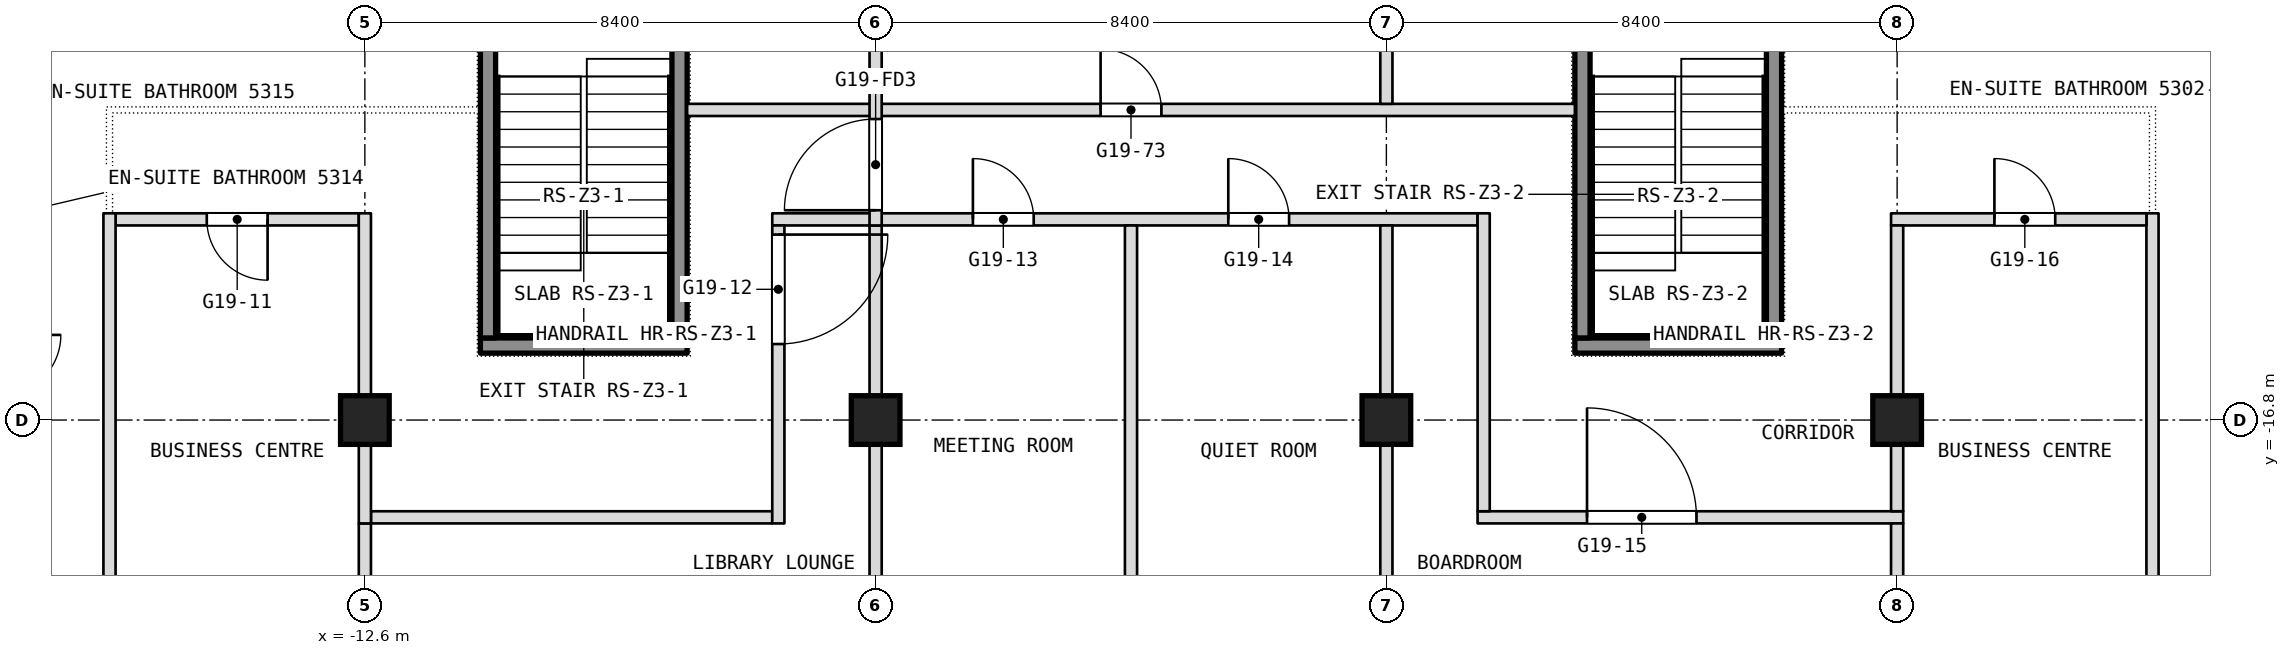
"""IFC4 building model, lengths in metres.
Left out: names, types, materials, properties, quantities, classifications, styles, units other than length and angle.
Written with IfcOpenShell. Run it as: python <this file> out.ifc"""

import sys

from ifc_helpers import new_model, si_unit, direction, frame, frame_2d, origin, origin_2d, place, context, subcontext, project, spatial, rectangle, extrude, element, fill, save


model = new_model("IFC4")
c1 = context("Model", 3, precision=1e-05, world=origin(), true_north=direction((0.0, 1.0)))
c2 = subcontext(c1, "Body", "Model", "MODEL_VIEW")
j1 = project(units=[si_unit("LENGTHUNIT", "METRE"), si_unit("PLANEANGLEUNIT", "RADIAN")], contexts=[c1])
p1 = place(None, origin())
s1 = spatial("IfcSite", under=j1, at=p1, CompositionType="ELEMENT")
p2 = place(p1, origin())
s2 = spatial("IfcBuilding", under=s1, at=p2, CompositionType="ELEMENT")
p3 = place(p2, frame((0.0, 0.0, 227.3)))
s3 = spatial("IfcBuildingStorey", under=s2, at=p3, CompositionType="ELEMENT", Elevation=227.3)
for number, where, z_axis, x_axis in (
    (1, (-12.6, -16.8, 0.0), (0.0, 0.0, 1.0), (1.0, 0.0, 0.0)),
    (2, (-4.2, -16.8, 0.0), (0.0, 0.0, 1.0), (1.0, 0.0, 0.0)),
    (3, (4.2, -16.8, 0.0), (0.0, 0.0, 1.0), (1.0, 0.0, 0.0)),
    (4, (12.6, -16.8, 0.0), (0.0, 0.0, 1.0), (1.0, 0.0, 0.0)),
):
    element("IfcColumn", number, at=place(p3, frame(where, z_axis=z_axis, x_axis=x_axis)), inside=s3, PredefinedType="COLUMN", context=c2, shape_type="SweptSolid", body=[
        extrude(rectangle(XDim=0.8, YDim=0.8, at=origin_2d()), origin(), (0.0, 0.0, 1.0), 3.6),
    ])
p4 = place(p3, frame((-12.5, -18.4, 0.0), z_axis=(0.0, 0.0, 1.0), x_axis=(1.0, 0.0, 0.0)))
e5 = element("IfcWall", 5, at=p4, inside=s3, PredefinedType="PARTITIONING", context=c2, shape_type="SweptSolid", body=[
    extrude(rectangle(XDim=6.6, YDim=0.2, at=frame_2d((3.3, 0.0))), origin(), (0.0, 0.0, 1.0), 3.34),
])
p5 = place(p3, frame((5.7, -18.4, 0.0), z_axis=(0.0, 0.0, 1.0), x_axis=(1.0, 0.0, 0.0)))
e6 = element("IfcWall", 6, at=p5, inside=s3, PredefinedType="PARTITIONING", context=c2, shape_type="SweptSolid", body=[
    extrude(rectangle(XDim=7.0, YDim=0.2, at=frame_2d((3.5, 0.0))), origin(), (0.0, 0.0, 1.0), 3.34),
])
p6 = place(p5, frame((1.8, 0.0, 0.0)))
e7 = element("IfcOpeningElement", 7, at=p6, cuts=e6, PredefinedType="OPENING", context=c2, shape_type="SweptSolid", body=[
    extrude(rectangle(XDim=1.8, YDim=2.1, at=frame_2d((0.9, 1.05))), frame((0.0, 0.1, 0.0), z_axis=(0.0, -1.0, 0.0), x_axis=(1.0, 0.0, 0.0)), (0.0, 0.0, 1.0), 0.2),
])
p7 = place(p3, frame((16.8, -20.2, 0.0), z_axis=(0.0, 0.0, 1.0), x_axis=(0.0, 1.0, 0.0)))
e8 = element("IfcWall", 8, at=p7, inside=s3, PredefinedType="PARTITIONING", context=c2, shape_type="SweptSolid", body=[
    extrude(rectangle(XDim=6.8, YDim=0.2, at=frame_2d((3.4, 0.0))), origin(), (0.0, 0.0, 1.0), 3.34),
])
p8 = place(p3, frame((-16.7, -13.5, 0.0), z_axis=(0.0, 0.0, 1.0), x_axis=(1.0, 0.0, 0.0)))
e9 = element("IfcWall", 9, at=p8, inside=s3, PredefinedType="PARTITIONING", context=c2, shape_type="SweptSolid", body=[
    extrude(rectangle(XDim=4.0, YDim=0.2, at=frame_2d((2.0, 0.0))), origin(), (0.0, 0.0, 1.0), 3.34),
])
p9 = place(p8, frame((1.5, 0.0, 0.0)))
e10 = element("IfcOpeningElement", 10, at=p9, cuts=e9, PredefinedType="OPENING", context=c2, shape_type="SweptSolid", body=[
    extrude(rectangle(XDim=1.0, YDim=2.1, at=frame_2d((0.5, 1.05))), frame((0.0, 0.1, 0.0), z_axis=(0.0, -1.0, 0.0), x_axis=(1.0, 0.0, 0.0)), (0.0, 0.0, 1.0), 0.2),
])
p10 = place(p3, frame((-5.9, -13.5, 0.0), z_axis=(0.0, 0.0, 1.0), x_axis=(1.0, 0.0, 0.0)))
e11 = element("IfcWall", 11, at=p10, inside=s3, PredefinedType="PARTITIONING", context=c2, shape_type="SweptSolid", body=[
    extrude(rectangle(XDim=11.6, YDim=0.2, at=frame_2d((5.8, 0.0))), origin(), (0.0, 0.0, 1.0), 3.34),
])
p11 = place(p10, frame((3.3, 0.0, 0.0)))
e12 = element("IfcOpeningElement", 12, at=p11, cuts=e11, PredefinedType="OPENING", context=c2, shape_type="SweptSolid", body=[
    extrude(rectangle(XDim=1.0, YDim=2.1, at=frame_2d((0.5, 1.05))), frame((0.0, 0.1, 0.0), z_axis=(0.0, -1.0, 0.0), x_axis=(1.0, 0.0, 0.0)), (0.0, 0.0, 1.0), 0.2),
])
p12 = place(p10, frame((7.5, 0.0, 0.0)))
e13 = element("IfcOpeningElement", 13, at=p12, cuts=e11, PredefinedType="OPENING", context=c2, shape_type="SweptSolid", body=[
    extrude(rectangle(XDim=1.0, YDim=2.1, at=frame_2d((0.5, 1.05))), frame((0.0, 0.1, 0.0), z_axis=(0.0, -1.0, 0.0), x_axis=(1.0, 0.0, 0.0)), (0.0, 0.0, 1.0), 0.2),
])
p13 = place(p3, frame((12.5, -13.5, 0.0), z_axis=(0.0, 0.0, 1.0), x_axis=(1.0, 0.0, 0.0)))
e14 = element("IfcWall", 14, at=p13, inside=s3, PredefinedType="PARTITIONING", context=c2, shape_type="SweptSolid", body=[
    extrude(rectangle(XDim=4.2, YDim=0.2, at=frame_2d((2.1, 0.0))), origin(), (0.0, 0.0, 1.0), 3.34),
])
p14 = place(p13, frame((1.7, 0.0, 0.0)))
e15 = element("IfcOpeningElement", 15, at=p14, cuts=e14, PredefinedType="OPENING", context=c2, shape_type="SweptSolid", body=[
    extrude(rectangle(XDim=1.0, YDim=2.1, at=frame_2d((0.5, 1.05))), frame((0.0, 0.1, 0.0), z_axis=(0.0, -1.0, 0.0), x_axis=(1.0, 0.0, 0.0)), (0.0, 0.0, 1.0), 0.2),
])
p15 = place(p3, frame((12.6, -20.0, 0.0), z_axis=(0.0, 0.0, 1.0), x_axis=(0.0, 1.0, 0.0)))
e16 = element("IfcWall", 16, at=p15, inside=s3, PredefinedType="PARTITIONING", context=c2, shape_type="SweptSolid", body=[
    extrude(rectangle(XDim=1.5, YDim=0.2, at=frame_2d((0.75, 0.0))), origin(), (0.0, 0.0, 1.0), 3.34),
])
p16 = place(p3, frame((12.6, -18.3, 0.0), z_axis=(0.0, 0.0, 1.0), x_axis=(0.0, 1.0, 0.0)))
e17 = element("IfcWall", 17, at=p16, inside=s3, PredefinedType="PARTITIONING", context=c2, shape_type="SweptSolid", body=[
    extrude(rectangle(XDim=4.7, YDim=0.2, at=frame_2d((2.35, 0.0))), origin(), (0.0, 0.0, 1.0), 3.34),
])
p17 = place(p3, frame((-7.3, -11.7, 0.0), z_axis=(0.0, 0.0, 1.0), x_axis=(1.0, 0.0, 0.0)))
e18 = element("IfcWall", 18, at=p17, inside=s3, PredefinedType="PARTITIONING", context=c2, shape_type="SweptSolid", body=[
    extrude(rectangle(XDim=14.6, YDim=0.2, at=frame_2d((7.3, 0.0))), origin(), (0.0, 0.0, 1.0), 3.34),
])
p18 = place(p17, frame((6.8, 0.0, 0.0)))
e19 = element("IfcOpeningElement", 19, at=p18, cuts=e18, PredefinedType="OPENING", context=c2, shape_type="SweptSolid", body=[
    extrude(rectangle(XDim=1.0, YDim=2.1, at=frame_2d((0.5, 1.05))), frame((0.0, 0.1, 0.0), z_axis=(0.0, -1.0, 0.0), x_axis=(1.0, 0.0, 0.0)), (0.0, 0.0, 1.0), 0.2),
])
p19 = place(p3, frame((5.8, -18.3, 0.0), z_axis=(0.0, 0.0, 1.0), x_axis=(0.0, 1.0, 0.0)))
e20 = element("IfcWall", 20, at=p19, inside=s3, PredefinedType="PARTITIONING", context=c2, shape_type="SweptSolid", body=[
    extrude(rectangle(XDim=4.9, YDim=0.2, at=frame_2d((2.45, 0.0))), origin(), (0.0, 0.0, 1.0), 3.34),
])
p20 = place(p3, frame((4.2, -20.0, 0.0), z_axis=(0.0, 0.0, 1.0), x_axis=(0.0, 1.0, 0.0)))
e21 = element("IfcWall", 21, at=p20, inside=s3, PredefinedType="PARTITIONING", context=c2, shape_type="SweptSolid", body=[
    extrude(rectangle(XDim=6.4, YDim=0.2, at=frame_2d((3.2, 0.0))), origin(), (0.0, 0.0, 1.0), 3.34),
])
p21 = place(p3, frame((4.2, -11.6, 0.0), z_axis=(0.0, 0.0, 1.0), x_axis=(0.0, 1.0, 0.0)))
e22 = element("IfcWall", 22, at=p21, inside=s3, PredefinedType="PARTITIONING", context=c2, shape_type="SweptSolid", body=[
    extrude(rectangle(XDim=9.7, YDim=0.2, at=frame_2d((4.85, 0.0))), origin(), (0.0, 0.0, 1.0), 3.34),
])
p22 = place(p3, frame((0.0, -20.0, 0.0), z_axis=(0.0, 0.0, 1.0), x_axis=(0.0, 1.0, 0.0)))
e23 = element("IfcWall", 23, at=p22, inside=s3, PredefinedType="PARTITIONING", context=c2, shape_type="SweptSolid", body=[
    extrude(rectangle(XDim=6.4, YDim=0.2, at=frame_2d((3.2, 0.0))), origin(), (0.0, 0.0, 1.0), 3.34),
])
p23 = place(p3, frame((-4.2, -22.0, 0.0), z_axis=(0.0, 0.0, 1.0), x_axis=(0.0, 1.0, 0.0)))
e24 = element("IfcWall", 24, at=p23, inside=s3, PredefinedType="PARTITIONING", context=c2, shape_type="SweptSolid", body=[
    extrude(rectangle(XDim=8.4, YDim=0.2, at=frame_2d((4.2, 0.0))), origin(), (0.0, 0.0, 1.0), 3.34),
])
p24 = place(p23, frame((0.25, 0.0, 0.0)))
e25 = element("IfcOpeningElement", 25, at=p24, cuts=e24, PredefinedType="OPENING", context=c2, shape_type="SweptSolid", body=[
    extrude(rectangle(XDim=1.5, YDim=2.1, at=frame_2d((0.75, 1.05))), frame((0.0, 0.1, 0.0), z_axis=(0.0, -1.0, 0.0), x_axis=(1.0, 0.0, 0.0)), (0.0, 0.0, 1.0), 0.2),
])
p25 = place(p3, frame((-4.2, -13.6, 0.0), z_axis=(0.0, 0.0, 1.0), x_axis=(0.0, 1.0, 0.0)))
e26 = element("IfcWall", 26, at=p25, inside=s3, PredefinedType="PARTITIONING", context=c2, shape_type="SweptSolid", body=[
    extrude(rectangle(XDim=13.6, YDim=0.2, at=frame_2d((6.8, 0.0))), origin(), (0.0, 0.0, 1.0), 3.34),
])
p26 = place(p25, frame((11.95, 0.0, 0.0)))
e27 = element("IfcOpeningElement", 27, at=p26, cuts=e26, PredefinedType="OPENING", context=c2, shape_type="SweptSolid", body=[
    extrude(rectangle(XDim=1.5, YDim=2.1, at=frame_2d((0.75, 1.05))), frame((0.0, 0.1, 0.0), z_axis=(0.0, -1.0, 0.0), x_axis=(1.0, 0.0, 0.0)), (0.0, 0.0, 1.0), 0.2),
])
p27 = place(p25, frame((0.25, 0.0, 0.0)))
e28 = element("IfcOpeningElement", 28, at=p27, cuts=e26, PredefinedType="OPENING", context=c2, shape_type="SweptSolid", body=[
    extrude(rectangle(XDim=1.5, YDim=2.1, at=frame_2d((0.75, 1.05))), frame((0.0, 0.1, 0.0), z_axis=(0.0, -1.0, 0.0), x_axis=(1.0, 0.0, 0.0)), (0.0, 0.0, 1.0), 0.2),
])
p28 = place(p3, frame((-5.8, -18.5, 0.0), z_axis=(0.0, 0.0, 1.0), x_axis=(0.0, 1.0, 0.0)))
e29 = element("IfcWall", 29, at=p28, inside=s3, PredefinedType="PARTITIONING", context=c2, shape_type="SweptSolid", body=[
    extrude(rectangle(XDim=4.9, YDim=0.2, at=frame_2d((2.45, 0.0))), origin(), (0.0, 0.0, 1.0), 3.34),
])
p29 = place(p28, frame((2.95, 0.0, 0.0)))
e30 = element("IfcOpeningElement", 30, at=p29, cuts=e29, PredefinedType="OPENING", context=c2, shape_type="SweptSolid", body=[
    extrude(rectangle(XDim=1.8, YDim=2.1, at=frame_2d((0.9, 1.05))), frame((0.0, 0.1, 0.0), z_axis=(0.0, -1.0, 0.0), x_axis=(1.0, 0.0, 0.0)), (0.0, 0.0, 1.0), 0.2),
])
p30 = place(p3, frame((-12.6, -20.0, 0.0), z_axis=(0.0, 0.0, 1.0), x_axis=(0.0, 1.0, 0.0)))
e31 = element("IfcWall", 31, at=p30, inside=s3, PredefinedType="PARTITIONING", context=c2, shape_type="SweptSolid", body=[
    extrude(rectangle(XDim=1.5, YDim=0.2, at=frame_2d((0.75, 0.0))), origin(), (0.0, 0.0, 1.0), 3.34),
])
p31 = place(p3, frame((-12.6, -18.5, 0.0), z_axis=(0.0, 0.0, 1.0), x_axis=(0.0, 1.0, 0.0)))
e32 = element("IfcWall", 32, at=p31, inside=s3, PredefinedType="PARTITIONING", context=c2, shape_type="SweptSolid", body=[
    extrude(rectangle(XDim=5.1, YDim=0.2, at=frame_2d((2.55, 0.0))), origin(), (0.0, 0.0, 1.0), 3.34),
])
p32 = place(p3, frame((-16.8, -20.2, 0.0), z_axis=(0.0, 0.0, 1.0), x_axis=(0.0, 1.0, 0.0)))
e33 = element("IfcWall", 33, at=p32, inside=s3, PredefinedType="PARTITIONING", context=c2, shape_type="SweptSolid", body=[
    extrude(rectangle(XDim=6.8, YDim=0.2, at=frame_2d((3.4, 0.0))), origin(), (0.0, 0.0, 1.0), 3.34),
])
p33 = place(p3, frame((-10.7, -15.575, 0.1), z_axis=(0.0, 0.0, 1.0), x_axis=(1.0, 0.0, 0.0)))
e34 = element("IfcWall", 34, at=p33, inside=s3, PredefinedType="SHEAR", context=c2, shape_type="SweptSolid", body=[
    extrude(rectangle(XDim=3.4, YDim=0.25, at=frame_2d((1.7, 0.0))), origin(), (0.0, 0.0, 1.0), 3.6),
])
for number, where, z_axis, x_axis in (
    (35, (-10.575, -15.45, 0.1), (0.0, 0.0, 1.0), (0.0, 1.0, 0.0)),
    (36, (-7.425, -15.45, 0.1), (0.0, 0.0, 1.0), (0.0, 1.0, 0.0)),
):
    element("IfcWall", number, at=place(p3, frame(where, z_axis=z_axis, x_axis=x_axis)), inside=s3, PredefinedType="SHEAR", context=c2, shape_type="SweptSolid", body=[
        extrude(rectangle(XDim=5.7, YDim=0.25, at=frame_2d((2.85, 0.0))), origin(), (0.0, 0.0, 1.0), 3.6),
    ])
p34 = place(p3, frame((7.3, -15.575, 0.1), z_axis=(0.0, 0.0, 1.0), x_axis=(1.0, 0.0, 0.0)))
e37 = element("IfcWall", 37, at=p34, inside=s3, PredefinedType="SHEAR", context=c2, shape_type="SweptSolid", body=[
    extrude(rectangle(XDim=3.4, YDim=0.25, at=frame_2d((1.7, 0.0))), origin(), (0.0, 0.0, 1.0), 3.6),
])
for number, where, z_axis, x_axis in (
    (38, (7.425, -15.45, 0.1), (0.0, 0.0, 1.0), (0.0, 1.0, 0.0)),
    (39, (10.575, -15.45, 0.1), (0.0, 0.0, 1.0), (0.0, 1.0, 0.0)),
):
    element("IfcWall", number, at=place(p3, frame(where, z_axis=z_axis, x_axis=x_axis)), inside=s3, PredefinedType="SHEAR", context=c2, shape_type="SweptSolid", body=[
        extrude(rectangle(XDim=5.7, YDim=0.25, at=frame_2d((2.85, 0.0))), origin(), (0.0, 0.0, 1.0), 3.6),
    ])
p35 = place(p6, origin())
e40 = element("IfcDoor", 40, at=p35, inside=s3, OperationType="DOUBLE_DOOR_SINGLE_SWING", PredefinedType="DOOR", context=c2, shape_type="SweptSolid", body=[
    extrude(rectangle(XDim=1.8, YDim=2.1, at=frame_2d((0.9, 1.05))), frame((0.0, 0.025, 0.0), z_axis=(0.0, -1.0, 0.0), x_axis=(1.0, 0.0, 0.0)), (0.0, 0.0, 1.0), 0.05),
])
fill(e7, e40)
p36 = place(p9, origin())
e41 = element("IfcDoor", 41, at=p36, inside=s3, OperationType="SINGLE_SWING_LEFT", PredefinedType="DOOR", context=c2, shape_type="SweptSolid", body=[
    extrude(rectangle(XDim=1.0, YDim=2.1, at=frame_2d((0.5, 1.05))), frame((0.0, 0.025, 0.0), z_axis=(0.0, -1.0, 0.0), x_axis=(1.0, 0.0, 0.0)), (0.0, 0.0, 1.0), 0.05),
])
fill(e10, e41)
p37 = place(p11, origin())
e42 = element("IfcDoor", 42, at=p37, inside=s3, OperationType="SINGLE_SWING_LEFT", PredefinedType="DOOR", context=c2, shape_type="SweptSolid", body=[
    extrude(rectangle(XDim=1.0, YDim=2.1, at=frame_2d((0.5, 1.05))), frame((0.0, 0.025, 0.0), z_axis=(0.0, -1.0, 0.0), x_axis=(1.0, 0.0, 0.0)), (0.0, 0.0, 1.0), 0.05),
])
fill(e12, e42)
p38 = place(p12, origin())
e43 = element("IfcDoor", 43, at=p38, inside=s3, OperationType="SINGLE_SWING_RIGHT", PredefinedType="DOOR", context=c2, shape_type="SweptSolid", body=[
    extrude(rectangle(XDim=1.0, YDim=2.1, at=frame_2d((0.5, 1.05))), frame((0.0, 0.025, 0.0), z_axis=(0.0, -1.0, 0.0), x_axis=(1.0, 0.0, 0.0)), (0.0, 0.0, 1.0), 0.05),
])
fill(e13, e43)
p39 = place(p14, origin())
e44 = element("IfcDoor", 44, at=p39, inside=s3, OperationType="SINGLE_SWING_RIGHT", PredefinedType="DOOR", context=c2, shape_type="SweptSolid", body=[
    extrude(rectangle(XDim=1.0, YDim=2.1, at=frame_2d((0.5, 1.05))), frame((0.0, 0.025, 0.0), z_axis=(0.0, -1.0, 0.0), x_axis=(1.0, 0.0, 0.0)), (0.0, 0.0, 1.0), 0.05),
])
fill(e15, e44)
p40 = place(p18, origin())
e45 = element("IfcDoor", 45, at=p40, inside=s3, OperationType="SINGLE_SWING_LEFT", PredefinedType="DOOR", context=c2, shape_type="SweptSolid", body=[
    extrude(rectangle(XDim=1.0, YDim=2.1, at=frame_2d((0.5, 1.05))), frame((0.0, 0.025, 0.0), z_axis=(0.0, -1.0, 0.0), x_axis=(1.0, 0.0, 0.0)), (0.0, 0.0, 1.0), 0.05),
])
fill(e19, e45)
p41 = place(p29, origin())
e46 = element("IfcDoor", 46, at=p41, inside=s3, OperationType="DOUBLE_DOOR_SINGLE_SWING", PredefinedType="DOOR", context=c2, shape_type="SweptSolid", body=[
    extrude(rectangle(XDim=1.8, YDim=2.1, at=frame_2d((0.9, 1.05))), frame((0.0, 0.025, 0.0), z_axis=(0.0, -1.0, 0.0), x_axis=(1.0, 0.0, 0.0)), (0.0, 0.0, 1.0), 0.05),
])
fill(e30, e46)
p42 = place(p27, origin())
e47 = element("IfcDoor", 47, at=p42, inside=s3, OperationType="DOUBLE_DOOR_DOUBLE_SWING", PredefinedType="DOOR", context=c2, shape_type="SweptSolid", body=[
    extrude(rectangle(XDim=1.5, YDim=2.1, at=frame_2d((0.75, 1.05))), frame((0.0, 0.025, 0.0), z_axis=(0.0, -1.0, 0.0), x_axis=(1.0, 0.0, 0.0)), (0.0, 0.0, 1.0), 0.05),
])
fill(e28, e47)
save(model, sys.argv[1])
